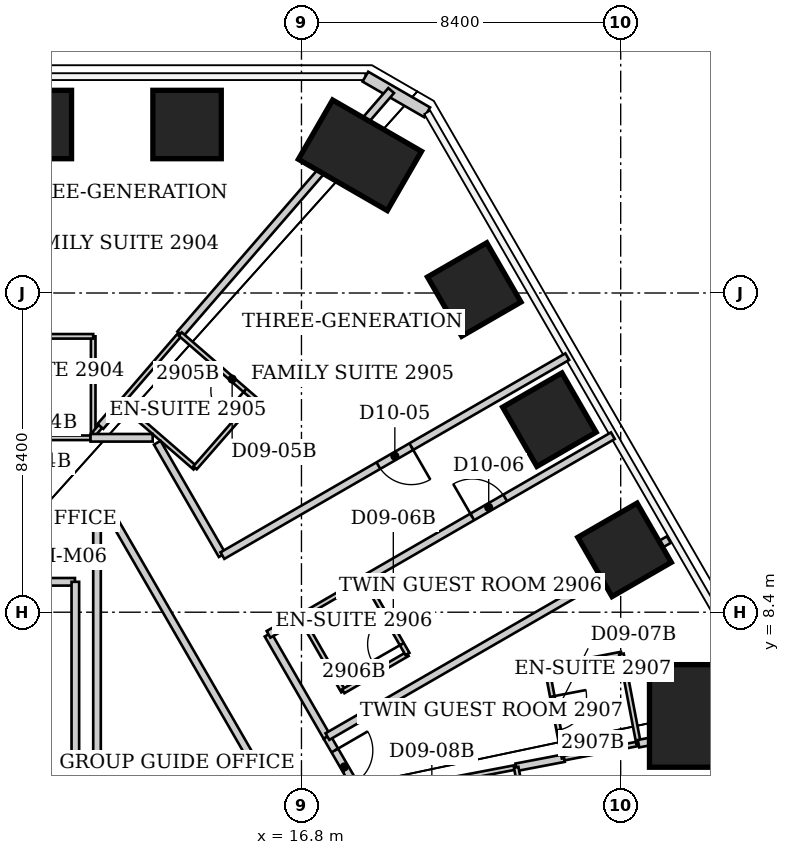
"""IFC4 building model, lengths in metres.
Left out: names, types, materials, properties, quantities, classifications, styles, units other than length and angle.
Written with IfcOpenShell. Run it as: python <this file> out.ifc"""

import sys

from ifc_helpers import new_model, si_unit, direction, frame, frame_2d, origin, origin_2d, place, context, subcontext, project, spatial, rectangle, extrude, element, fill, save


model = new_model("IFC4")
c1 = context("Model", 3, precision=1e-05, world=origin(), true_north=direction((0.0, 1.0)))
c2 = subcontext(c1, "Body", "Model", "MODEL_VIEW")
j1 = project(units=[si_unit("LENGTHUNIT", "METRE"), si_unit("PLANEANGLEUNIT", "RADIAN")], contexts=[c1])
p1 = place(None, origin())
s1 = spatial("IfcSite", under=j1, at=p1, CompositionType="ELEMENT")
p2 = place(p1, origin())
s2 = spatial("IfcBuilding", under=s1, at=p2, CompositionType="ELEMENT")
p3 = place(p2, frame((0.0, 0.0, 119.6)))
s3 = spatial("IfcBuildingStorey", under=s2, at=p3, CompositionType="ELEMENT", Elevation=119.6)
for number, where, z_axis, x_axis in (
    (1, (9.85, 21.234, 0.0), (0.0, 0.0, 1.0), (0.0, 1.0, 0.0)),
    (2, (13.79, 21.234, 0.0), (0.0, 0.0, 1.0), (0.0, 1.0, 0.0)),
):
    element("IfcColumn", number, at=place(p3, frame(where, z_axis=z_axis, x_axis=x_axis)), inside=s3, PredefinedType="COLUMN", context=c2, shape_type="SweptSolid", body=[
        extrude(rectangle(XDim=1.8, YDim=1.8, at=origin_2d()), origin(), (0.0, 0.0, 1.0), 3.8),
    ])
p4 = place(p3, frame((18.339, 20.424, 0.0), z_axis=(0.0, 0.0, 1.0), x_axis=(0.5, 0.866025403784, 0.0)))
e3 = element("IfcColumn", 3, at=p4, inside=s3, PredefinedType="COLUMN", context=c2, shape_type="SweptSolid", body=[
    extrude(rectangle(XDim=1.8, YDim=2.7, at=origin_2d()), origin(), (0.0, 0.0, 1.0), 3.8),
])
for number, where, z_axis, x_axis in (
    (4, (21.346, 16.891, 0.0), (0.0, 0.0, 1.0), (0.866, 0.5, 0.0)),
    (5, (23.324, 13.466, 0.0), (0.0, 0.0, 1.0), (0.866, 0.5, 0.0)),
    (6, (25.302, 10.041, 0.0), (0.0, 0.0, 1.0), (0.866, 0.5, 0.0)),
):
    element("IfcColumn", number, at=place(p3, frame(where, z_axis=z_axis, x_axis=x_axis)), inside=s3, PredefinedType="COLUMN", context=c2, shape_type="SweptSolid", body=[
        extrude(rectangle(XDim=1.8, YDim=1.8, at=origin_2d()), origin(), (0.0, 0.0, 1.0), 3.8),
    ])
p5 = place(p3, frame((26.857, 5.67, 0.0), z_axis=(0.0, 0.0, 1.0), x_axis=(1.0, 0.0, 0.0)))
e7 = element("IfcColumn", 7, at=p5, inside=s3, PredefinedType="COLUMN", context=c2, shape_type="SweptSolid", body=[
    extrude(rectangle(XDim=1.8, YDim=2.7, at=origin_2d()), origin(), (0.0, 0.0, 1.0), 3.8),
])
p6 = place(p3, frame((18.481, 22.494, 0.0), z_axis=(0.0, 0.0, 1.0), x_axis=(0.865988793993, -0.500063404658, 0.0)))
e8 = element("IfcWall", 8, at=p6, inside=s3, PredefinedType="SOLIDWALL", context=c2, shape_type="SweptSolid", body=[
    extrude(rectangle(XDim=1.88, YDim=0.3, at=frame_2d((0.94, 0.0))), origin(), (0.0, 0.0, 1.0), 3.64),
])
p7 = place(p3, frame((6.85, 10.99, 0.0), z_axis=(0.0, 0.0, 1.0), x_axis=(1.0, 0.0, 0.0)))
e9 = element("IfcWall", 9, at=p7, inside=s3, PredefinedType="PARTITIONING", context=c2, shape_type="SweptSolid", body=[
    extrude(rectangle(XDim=4.57, YDim=0.2, at=frame_2d((2.285, 0.0))), origin(), (0.0, 0.0, 1.0), 3.64),
])
p8 = place(p7, frame((1.735, 0.0, 0.0)))
e10 = element("IfcOpeningElement", 10, at=p8, cuts=e9, PredefinedType="OPENING", context=c2, shape_type="SweptSolid", body=[
    extrude(rectangle(XDim=1.1, YDim=2.2, at=frame_2d((0.55, 1.1))), frame((0.0, 0.1, 0.0), z_axis=(0.0, -1.0, 0.0), x_axis=(1.0, 0.0, 0.0)), (0.0, 0.0, 1.0), 0.2),
])
p9 = place(p3, frame((10.84, 9.2, 0.0), z_axis=(0.0, 0.0, 1.0), x_axis=(-1.0, 0.0, 0.0)))
e11 = element("IfcWall", 11, at=p9, inside=s3, PredefinedType="PARTITIONING", context=c2, shape_type="SweptSolid", body=[
    extrude(rectangle(XDim=3.99, YDim=0.2, at=frame_2d((1.995, 0.0))), origin(), (0.0, 0.0, 1.0), 3.64),
])
p10 = place(p3, frame((10.85, -5.19, 0.0), z_axis=(0.0, 0.0, 1.0), x_axis=(0.0, 1.0, 0.0)))
e12 = element("IfcWall", 12, at=p10, inside=s3, PredefinedType="PARTITIONING", context=c2, shape_type="SweptSolid", body=[
    extrude(rectangle(XDim=14.39, YDim=0.2, at=frame_2d((7.195, 0.0))), origin(), (0.0, 0.0, 1.0), 3.64),
])
p11 = place(p3, frame((11.25, 12.99, 0.0), z_axis=(0.0, 0.0, 1.0), x_axis=(-1.0, 0.0, 0.0)))
e13 = element("IfcWall", 13, at=p11, inside=s3, PredefinedType="PARTITIONING", context=c2, shape_type="SweptSolid", body=[
    extrude(rectangle(XDim=2.43, YDim=0.12, at=frame_2d((1.215, 0.0))), origin(), (0.0, 0.0, 1.0), 3.64),
])
p12 = place(p3, frame((11.32, 13.07, 0.0), z_axis=(0.0, 0.0, 1.0), x_axis=(0.0, 1.0, 0.0)))
e14 = element("IfcWall", 14, at=p12, inside=s3, PredefinedType="PARTITIONING", context=c2, shape_type="SweptSolid", body=[
    extrude(rectangle(XDim=2.59, YDim=0.12, at=frame_2d((1.295, 0.0))), origin(), (0.0, 0.0, 1.0), 3.64),
])
p13 = place(p3, frame((11.32, 15.66, 0.0), z_axis=(0.0, 0.0, 1.0), x_axis=(-1.0, 0.0, 0.0)))
e15 = element("IfcWall", 15, at=p13, inside=s3, PredefinedType="PARTITIONING", context=c2, shape_type="SweptSolid", body=[
    extrude(rectangle(XDim=2.5, YDim=0.12, at=frame_2d((1.25, 0.0))), origin(), (0.0, 0.0, 1.0), 3.64),
])
p14 = place(p3, frame((11.336, 13.089, 0.0), z_axis=(0.0, 0.0, 1.0), x_axis=(0.65328489719, 0.757112173396, 0.0)))
e16 = element("IfcWall", 16, at=p14, inside=s3, PredefinedType="PARTITIONING", context=c2, shape_type="SweptSolid", body=[
    extrude(rectangle(XDim=0.266, YDim=0.12, at=frame_2d((0.133, 0.0))), origin(), (0.0, 0.0, 1.0), 3.64),
])
p15 = place(p3, frame((11.42, 10.98, 0.0), z_axis=(0.0, 0.0, 1.0), x_axis=(0.0, -1.0, 0.0)))
e17 = element("IfcWall", 17, at=p15, inside=s3, PredefinedType="PARTITIONING", context=c2, shape_type="SweptSolid", body=[
    extrude(rectangle(XDim=14.985, YDim=0.2, at=frame_2d((7.492, 0.0))), origin(), (0.0, 0.0, 1.0), 3.64),
])
p16 = place(p3, frame((11.42, 10.99, 0.0), z_axis=(0.0, 0.0, 1.0), x_axis=(1.0, 0.0, 0.0)))
e18 = element("IfcWall", 18, at=p16, inside=s3, PredefinedType="PARTITIONING", context=c2, shape_type="SweptSolid", body=[
    extrude(rectangle(XDim=0.35, YDim=0.2, at=frame_2d((0.175, 0.0))), origin(), (0.0, 0.0, 1.0), 3.64),
])
p17 = place(p3, frame((11.51, 13.29, 0.0), z_axis=(0.0, 0.0, 1.0), x_axis=(0.655976713225, 0.754781128345, 0.0)))
e19 = element("IfcWall", 19, at=p17, inside=s3, PredefinedType="PARTITIONING", context=c2, shape_type="SweptSolid", body=[
    extrude(rectangle(XDim=0.808, YDim=0.2, at=frame_2d((0.404, 0.0))), origin(), (0.0, 0.0, 1.0), 3.64),
])
p18 = place(p3, frame((11.77, 10.99, 0.0), z_axis=(0.0, 0.0, 1.0), x_axis=(0.500093981358, -0.865971136822, 0.0)))
e20 = element("IfcWall", 20, at=p18, inside=s3, PredefinedType="PARTITIONING", context=c2, shape_type="SweptSolid", body=[
    extrude(rectangle(XDim=8.418, YDim=0.2, at=frame_2d((4.209, 0.0))), origin(), (0.0, 0.0, 1.0), 3.64),
])
p19 = place(p3, frame((12.039, 13.901, 0.0), z_axis=(0.0, 0.0, 1.0), x_axis=(0.653622514847, 0.756820723874, 0.0)))
e21 = element("IfcWall", 21, at=p19, inside=s3, PredefinedType="PARTITIONING", context=c2, shape_type="SweptSolid", body=[
    extrude(rectangle(XDim=2.404, YDim=0.12, at=frame_2d((1.202, 0.0))), origin(), (0.0, 0.0, 1.0), 3.64),
])
p20 = place(p3, frame((12.04, 13.9, 0.0), z_axis=(0.0, 0.0, 1.0), x_axis=(0.755437535555, -0.655220672655, 0.0)))
e22 = element("IfcWall", 22, at=p20, inside=s3, PredefinedType="PARTITIONING", context=c2, shape_type="SweptSolid", body=[
    extrude(rectangle(XDim=2.594, YDim=0.12, at=frame_2d((1.297, 0.0))), origin(), (0.0, 0.0, 1.0), 3.64),
])
p21 = place(p3, frame((12.885, 12.99, 0.0), z_axis=(0.0, 0.0, 1.0), x_axis=(-1.0, 0.0, 0.0)))
e23 = element("IfcWall", 23, at=p21, inside=s3, PredefinedType="PARTITIONING", context=c2, shape_type="SweptSolid", body=[
    extrude(rectangle(XDim=1.635, YDim=0.2, at=frame_2d((0.817, 0.0))), origin(), (0.0, 0.0, 1.0), 3.64),
])
p22 = place(p3, frame((13.005, 12.86, 0.0), z_axis=(0.0, 0.0, 1.0), x_axis=(0.500007161152, -0.866021269252, 0.0)))
e24 = element("IfcWall", 24, at=p22, inside=s3, PredefinedType="PARTITIONING", context=c2, shape_type="SweptSolid", body=[
    extrude(rectangle(XDim=3.415, YDim=0.2, at=frame_2d((1.707, 0.0))), origin(), (0.0, 0.0, 1.0), 3.64),
])
p23 = place(p3, frame((13.61, 15.72, 0.0), z_axis=(0.0, 0.0, 1.0), x_axis=(0.654752892245, 0.75584300625, 0.0)))
e25 = element("IfcWall", 25, at=p23, inside=s3, PredefinedType="PARTITIONING", context=c2, shape_type="SweptSolid", body=[
    extrude(rectangle(XDim=8.477, YDim=0.2, at=frame_2d((4.238, 0.0))), origin(), (0.0, 0.0, 1.0), 3.64),
])
p24 = place(p3, frame((14.0, 12.2, 0.0), z_axis=(0.0, 0.0, 1.0), x_axis=(0.657626528627, 0.753344110514, 0.0)))
e26 = element("IfcWall", 26, at=p24, inside=s3, PredefinedType="PARTITIONING", context=c2, shape_type="SweptSolid", body=[
    extrude(rectangle(XDim=2.403, YDim=0.12, at=frame_2d((1.201, 0.0))), origin(), (0.0, 0.0, 1.0), 3.64),
])
p25 = place(p3, frame((15.58, 14.01, 0.0), z_axis=(0.0, 0.0, 1.0), x_axis=(-0.755185511235, 0.655511131576, 0.0)))
e27 = element("IfcWall", 27, at=p25, inside=s3, PredefinedType="PARTITIONING", context=c2, shape_type="SweptSolid", body=[
    extrude(rectangle(XDim=2.609, YDim=0.12, at=frame_2d((1.304, 0.0))), origin(), (0.0, 0.0, 1.0), 3.64),
])
p26 = place(p25, frame((0.35, 0.0, 0.0)))
e28 = element("IfcOpeningElement", 28, at=p26, cuts=e27, PredefinedType="OPENING", context=c2, shape_type="SweptSolid", body=[
    extrude(rectangle(XDim=0.9, YDim=2.03, at=frame_2d((0.45, 1.015))), frame((0.0, 0.06, 0.0), z_axis=(0.0, -1.0, 0.0), x_axis=(1.0, 0.0, 0.0)), (0.0, 0.0, 1.0), 0.12),
])
p27 = place(p3, frame((15.92, 7.81, 0.0), z_axis=(0.0, 0.0, 1.0), x_axis=(0.499277611559, -0.866442073422, 0.0)))
e29 = element("IfcWall", 29, at=p27, inside=s3, PredefinedType="PARTITIONING", context=c2, shape_type="SweptSolid", body=[
    extrude(rectangle(XDim=3.104, YDim=0.2, at=frame_2d((1.552, 0.0))), origin(), (0.0, 0.0, 1.0), 3.64),
])
p28 = place(p3, frame((15.933, 7.817, 0.0), z_axis=(0.0, 0.0, 1.0), x_axis=(0.870733094426, 0.491755913305, 0.0)))
e30 = element("IfcWall", 30, at=p28, inside=s3, PredefinedType="PARTITIONING", context=c2, shape_type="SweptSolid", body=[
    extrude(rectangle(XDim=0.961, YDim=0.2, at=frame_2d((0.48, 0.0))), origin(), (0.0, 0.0, 1.0), 3.64),
])
p29 = place(p3, frame((16.77, 8.29, 0.0), z_axis=(0.0, 0.0, 1.0), x_axis=(0.497527583083, -0.867448156417, 0.0)))
e31 = element("IfcWall", 31, at=p29, inside=s3, PredefinedType="PARTITIONING", context=c2, shape_type="SweptSolid", body=[
    extrude(rectangle(XDim=2.271, YDim=0.12, at=frame_2d((1.135, 0.0))), origin(), (0.0, 0.0, 1.0), 3.64),
])
p30 = place(p3, frame((16.77, 8.29, 0.0), z_axis=(0.0, 0.0, 1.0), x_axis=(0.86507240805, 0.501647016168, 0.0)))
e32 = element("IfcWall", 32, at=p30, inside=s3, PredefinedType="PARTITIONING", context=c2, shape_type="SweptSolid", body=[
    extrude(rectangle(XDim=1.954, YDim=0.12, at=frame_2d((0.977, 0.0))), origin(), (0.0, 0.0, 1.0), 3.64),
])
p31 = place(p3, frame((17.47, 5.12, 0.0), z_axis=(0.0, 0.0, 1.0), x_axis=(0.501536229379, -0.865136642745, 0.0)))
e33 = element("IfcWall", 33, at=p31, inside=s3, PredefinedType="PARTITIONING", context=c2, shape_type="SweptSolid", body=[
    extrude(rectangle(XDim=1.828, YDim=0.2, at=frame_2d((0.914, 0.0))), origin(), (0.0, 0.0, 1.0), 3.64),
])
p32 = place(p31, frame((0.414, 0.0, 0.0)))
e34 = element("IfcOpeningElement", 34, at=p32, cuts=e33, PredefinedType="OPENING", context=c2, shape_type="SweptSolid", body=[
    extrude(rectangle(XDim=1.0, YDim=2.13, at=frame_2d((0.5, 1.065))), frame((0.0, 0.1, 0.0), z_axis=(0.0, -1.0, 0.0), x_axis=(1.0, 0.0, 0.0)), (0.0, 0.0, 1.0), 0.2),
])
p33 = place(p3, frame((17.9, 6.32, 0.0), z_axis=(0.0, 0.0, 1.0), x_axis=(0.865103852711, 0.501592787055, 0.0)))
e35 = element("IfcWall", 35, at=p33, inside=s3, PredefinedType="PARTITIONING", context=c2, shape_type="SweptSolid", body=[
    extrude(rectangle(XDim=1.954, YDim=0.12, at=frame_2d((0.977, 0.0))), origin(), (0.0, 0.0, 1.0), 3.64),
])
p34 = place(p3, frame((18.46, 9.27, 0.0), z_axis=(0.0, 0.0, 1.0), x_axis=(0.865880021885, 0.500251724335, 0.0)))
e36 = element("IfcWall", 36, at=p34, inside=s3, PredefinedType="PARTITIONING", context=c2, shape_type="SweptSolid", body=[
    extrude(rectangle(XDim=7.546, YDim=0.2, at=frame_2d((3.773, 0.0))), origin(), (0.0, 0.0, 1.0), 3.64),
])
p35 = place(p34, frame((3.273, 0.0, 0.0)))
e37 = element("IfcOpeningElement", 37, at=p35, cuts=e36, PredefinedType="OPENING", context=c2, shape_type="SweptSolid", body=[
    extrude(rectangle(XDim=1.0, YDim=2.13, at=frame_2d((0.5, 1.065))), frame((0.0, 0.1, 0.0), z_axis=(0.0, -1.0, 0.0), x_axis=(1.0, 0.0, 0.0)), (0.0, 0.0, 1.0), 0.2),
])
p36 = place(p3, frame((19.59, 7.3, 0.0), z_axis=(0.0, 0.0, 1.0), x_axis=(-0.49760846958, 0.867401758704, 0.0)))
e38 = element("IfcWall", 38, at=p36, inside=s3, PredefinedType="PARTITIONING", context=c2, shape_type="SweptSolid", body=[
    extrude(rectangle(XDim=2.271, YDim=0.12, at=frame_2d((1.135, 0.0))), origin(), (0.0, 0.0, 1.0), 3.64),
])
p37 = place(p36, frame((0.3, 0.0, 0.0)))
e39 = element("IfcOpeningElement", 39, at=p37, cuts=e38, PredefinedType="OPENING", context=c2, shape_type="SweptSolid", body=[
    extrude(rectangle(XDim=0.9, YDim=2.03, at=frame_2d((0.45, 1.015))), frame((0.0, 0.06, 0.0), z_axis=(0.0, -1.0, 0.0), x_axis=(1.0, 0.0, 0.0)), (0.0, 0.0, 1.0), 0.12),
])
p38 = place(p3, frame((20.09, 3.87, 0.0), z_axis=(0.0, 0.0, 1.0), x_axis=(0.982303859288, 0.187294228499, 0.0)))
e40 = element("IfcWall", 40, at=p38, inside=s3, PredefinedType="PARTITIONING", context=c2, shape_type="SweptSolid", body=[
    extrude(rectangle(XDim=2.402, YDim=0.12, at=frame_2d((1.201, 0.0))), origin(), (0.0, 0.0, 1.0), 3.64),
])
p39 = place(p3, frame((22.45, 4.32, 0.0), z_axis=(0.0, 0.0, 1.0), x_axis=(0.982340232372, 0.187103361446, 0.0)))
e41 = element("IfcWall", 41, at=p39, inside=s3, PredefinedType="PARTITIONING", context=c2, shape_type="SweptSolid", body=[
    extrude(rectangle(XDim=1.283, YDim=0.2, at=frame_2d((0.641, 0.0))), origin(), (0.0, 0.0, 1.0), 3.64),
])
p40 = place(p3, frame((22.94, 1.77, 0.0), z_axis=(0.0, 0.0, 1.0), x_axis=(-0.188697442844, 0.982035271802, 0.0)))
e42 = element("IfcWall", 42, at=p40, inside=s3, PredefinedType="PARTITIONING", context=c2, shape_type="SweptSolid", body=[
    extrude(rectangle(XDim=2.597, YDim=0.12, at=frame_2d((1.298, 0.0))), origin(), (0.0, 0.0, 1.0), 3.64),
])
p41 = place(p3, frame((23.26, 6.92, 0.0), z_axis=(0.0, 0.0, 1.0), x_axis=(0.187294228499, -0.982303859288, 0.0)))
e43 = element("IfcWall", 43, at=p41, inside=s3, PredefinedType="PARTITIONING", context=c2, shape_type="SweptSolid", body=[
    extrude(rectangle(XDim=2.402, YDim=0.12, at=frame_2d((1.201, 0.0))), origin(), (0.0, 0.0, 1.0), 3.64),
])
p42 = place(p41, frame((0.75, 0.0, 0.0)))
e44 = element("IfcOpeningElement", 44, at=p42, cuts=e43, PredefinedType="OPENING", context=c2, shape_type="SweptSolid", body=[
    extrude(rectangle(XDim=0.9, YDim=2.03, at=frame_2d((0.45, 1.015))), frame((0.0, 0.06, 0.0), z_axis=(0.0, -1.0, 0.0), x_axis=(1.0, 0.0, 0.0)), (0.0, 0.0, 1.0), 0.12),
])
p43 = place(p3, frame((23.71, 4.56, 0.0), z_axis=(0.0, 0.0, 1.0), x_axis=(0.981729772821, 0.190280459207, 0.0)))
e45 = element("IfcWall", 45, at=p43, inside=s3, PredefinedType="PARTITIONING", context=c2, shape_type="SweptSolid", body=[
    extrude(rectangle(XDim=1.996, YDim=0.12, at=frame_2d((0.998, 0.0))), origin(), (0.0, 0.0, 1.0), 3.64),
])
p44 = place(p3, frame((23.794, 15.125, 0.0), z_axis=(0.0, 0.0, 1.0), x_axis=(-0.866190629897, -0.499713710718, 0.0)))
e46 = element("IfcWall", 46, at=p44, inside=s3, PredefinedType="PARTITIONING", context=c2, shape_type="SweptSolid", body=[
    extrude(rectangle(XDim=10.476, YDim=0.2, at=frame_2d((5.238, 0.0))), origin(), (0.0, 0.0, 1.0), 3.64),
])
p45 = place(p44, frame((4.738, 0.0, 0.0)))
e47 = element("IfcOpeningElement", 47, at=p45, cuts=e46, PredefinedType="OPENING", context=c2, shape_type="SweptSolid", body=[
    extrude(rectangle(XDim=1.0, YDim=2.13, at=frame_2d((0.5, 1.065))), frame((0.0, 0.1, 0.0), z_axis=(0.0, -1.0, 0.0), x_axis=(1.0, 0.0, 0.0)), (0.0, 0.0, 1.0), 0.2),
])
p46 = place(p3, frame((25.22, 7.3, 0.0), z_axis=(0.0, 0.0, 1.0), x_axis=(-0.981706922352, -0.190398315658, 0.0)))
e48 = element("IfcWall", 48, at=p46, inside=s3, PredefinedType="PARTITIONING", context=c2, shape_type="SweptSolid", body=[
    extrude(rectangle(XDim=1.997, YDim=0.12, at=frame_2d((0.998, 0.0))), origin(), (0.0, 0.0, 1.0), 3.64),
])
p47 = place(p3, frame((25.67, 4.94, 0.0), z_axis=(0.0, 0.0, 1.0), x_axis=(-0.187275533444, 0.982307423658, 0.0)))
e49 = element("IfcWall", 49, at=p47, inside=s3, PredefinedType="PARTITIONING", context=c2, shape_type="SweptSolid", body=[
    extrude(rectangle(XDim=2.403, YDim=0.12, at=frame_2d((1.201, 0.0))), origin(), (0.0, 0.0, 1.0), 3.64),
])
p48 = place(p3, frame((25.67, 4.94, 0.0), z_axis=(0.0, 0.0, 1.0), x_axis=(0.981783608641, 0.190002488943, 0.0)))
e50 = element("IfcWall", 50, at=p48, inside=s3, PredefinedType="PARTITIONING", context=c2, shape_type="SweptSolid", body=[
    extrude(rectangle(XDim=3.127, YDim=0.2, at=frame_2d((1.564, 0.0))), origin(), (0.0, 0.0, 1.0), 3.64),
])
p49 = place(p3, frame((26.466, 10.31, 0.0), z_axis=(0.0, 0.0, 1.0), x_axis=(-0.866184410312, -0.499724491428, 0.0)))
e51 = element("IfcWall", 51, at=p49, inside=s3, PredefinedType="PARTITIONING", context=c2, shape_type="SweptSolid", body=[
    extrude(rectangle(XDim=10.371, YDim=0.2, at=frame_2d((5.186, 0.0))), origin(), (0.0, 0.0, 1.0), 3.64),
])
p50 = place(p45, origin())
e52 = element("IfcDoor", 52, at=p50, inside=s3, OperationType="SINGLE_SWING_LEFT", PredefinedType="DOOR", context=c2, shape_type="SweptSolid", body=[
    extrude(rectangle(XDim=1.0, YDim=2.13, at=frame_2d((0.5, 1.065))), frame((0.0, 0.025, 0.0), z_axis=(0.0, -1.0, 0.0), x_axis=(1.0, 0.0, 0.0)), (0.0, 0.0, 1.0), 0.05),
])
fill(e47, e52)
p51 = place(p26, origin())
e53 = element("IfcDoor", 53, at=p51, inside=s3, OperationType="SINGLE_SWING_LEFT", PredefinedType="DOOR", context=c2, shape_type="SweptSolid", body=[
    extrude(rectangle(XDim=0.9, YDim=2.03, at=frame_2d((0.45, 1.015))), frame((0.0, 0.025, 0.0), z_axis=(0.0, -1.0, 0.0), x_axis=(1.0, 0.0, 0.0)), (0.0, 0.0, 1.0), 0.05),
])
fill(e28, e53)
p52 = place(p35, origin())
e54 = element("IfcDoor", 54, at=p52, inside=s3, OperationType="SINGLE_SWING_LEFT", PredefinedType="DOOR", context=c2, shape_type="SweptSolid", body=[
    extrude(rectangle(XDim=1.0, YDim=2.13, at=frame_2d((0.5, 1.065))), frame((0.0, 0.025, 0.0), z_axis=(0.0, -1.0, 0.0), x_axis=(1.0, 0.0, 0.0)), (0.0, 0.0, 1.0), 0.05),
])
fill(e37, e54)
p53 = place(p37, origin())
e55 = element("IfcDoor", 55, at=p53, inside=s3, OperationType="SINGLE_SWING_LEFT", PredefinedType="DOOR", context=c2, shape_type="SweptSolid", body=[
    extrude(rectangle(XDim=0.9, YDim=2.03, at=frame_2d((0.45, 1.015))), frame((0.0, 0.025, 0.0), z_axis=(0.0, -1.0, 0.0), x_axis=(1.0, 0.0, 0.0)), (0.0, 0.0, 1.0), 0.05),
])
fill(e39, e55)
p54 = place(p32, origin())
e56 = element("IfcDoor", 56, at=p54, inside=s3, OperationType="SINGLE_SWING_LEFT", PredefinedType="DOOR", context=c2, shape_type="SweptSolid", body=[
    extrude(rectangle(XDim=1.0, YDim=2.13, at=frame_2d((0.5, 1.065))), frame((0.0, 0.025, 0.0), z_axis=(0.0, -1.0, 0.0), x_axis=(1.0, 0.0, 0.0)), (0.0, 0.0, 1.0), 0.05),
])
fill(e34, e56)
p55 = place(p42, origin())
e57 = element("IfcDoor", 57, at=p55, inside=s3, OperationType="SINGLE_SWING_LEFT", PredefinedType="DOOR", context=c2, shape_type="SweptSolid", body=[
    extrude(rectangle(XDim=0.9, YDim=2.03, at=frame_2d((0.45, 1.015))), frame((0.0, 0.025, 0.0), z_axis=(0.0, -1.0, 0.0), x_axis=(1.0, 0.0, 0.0)), (0.0, 0.0, 1.0), 0.05),
])
fill(e44, e57)
save(model, sys.argv[1])
